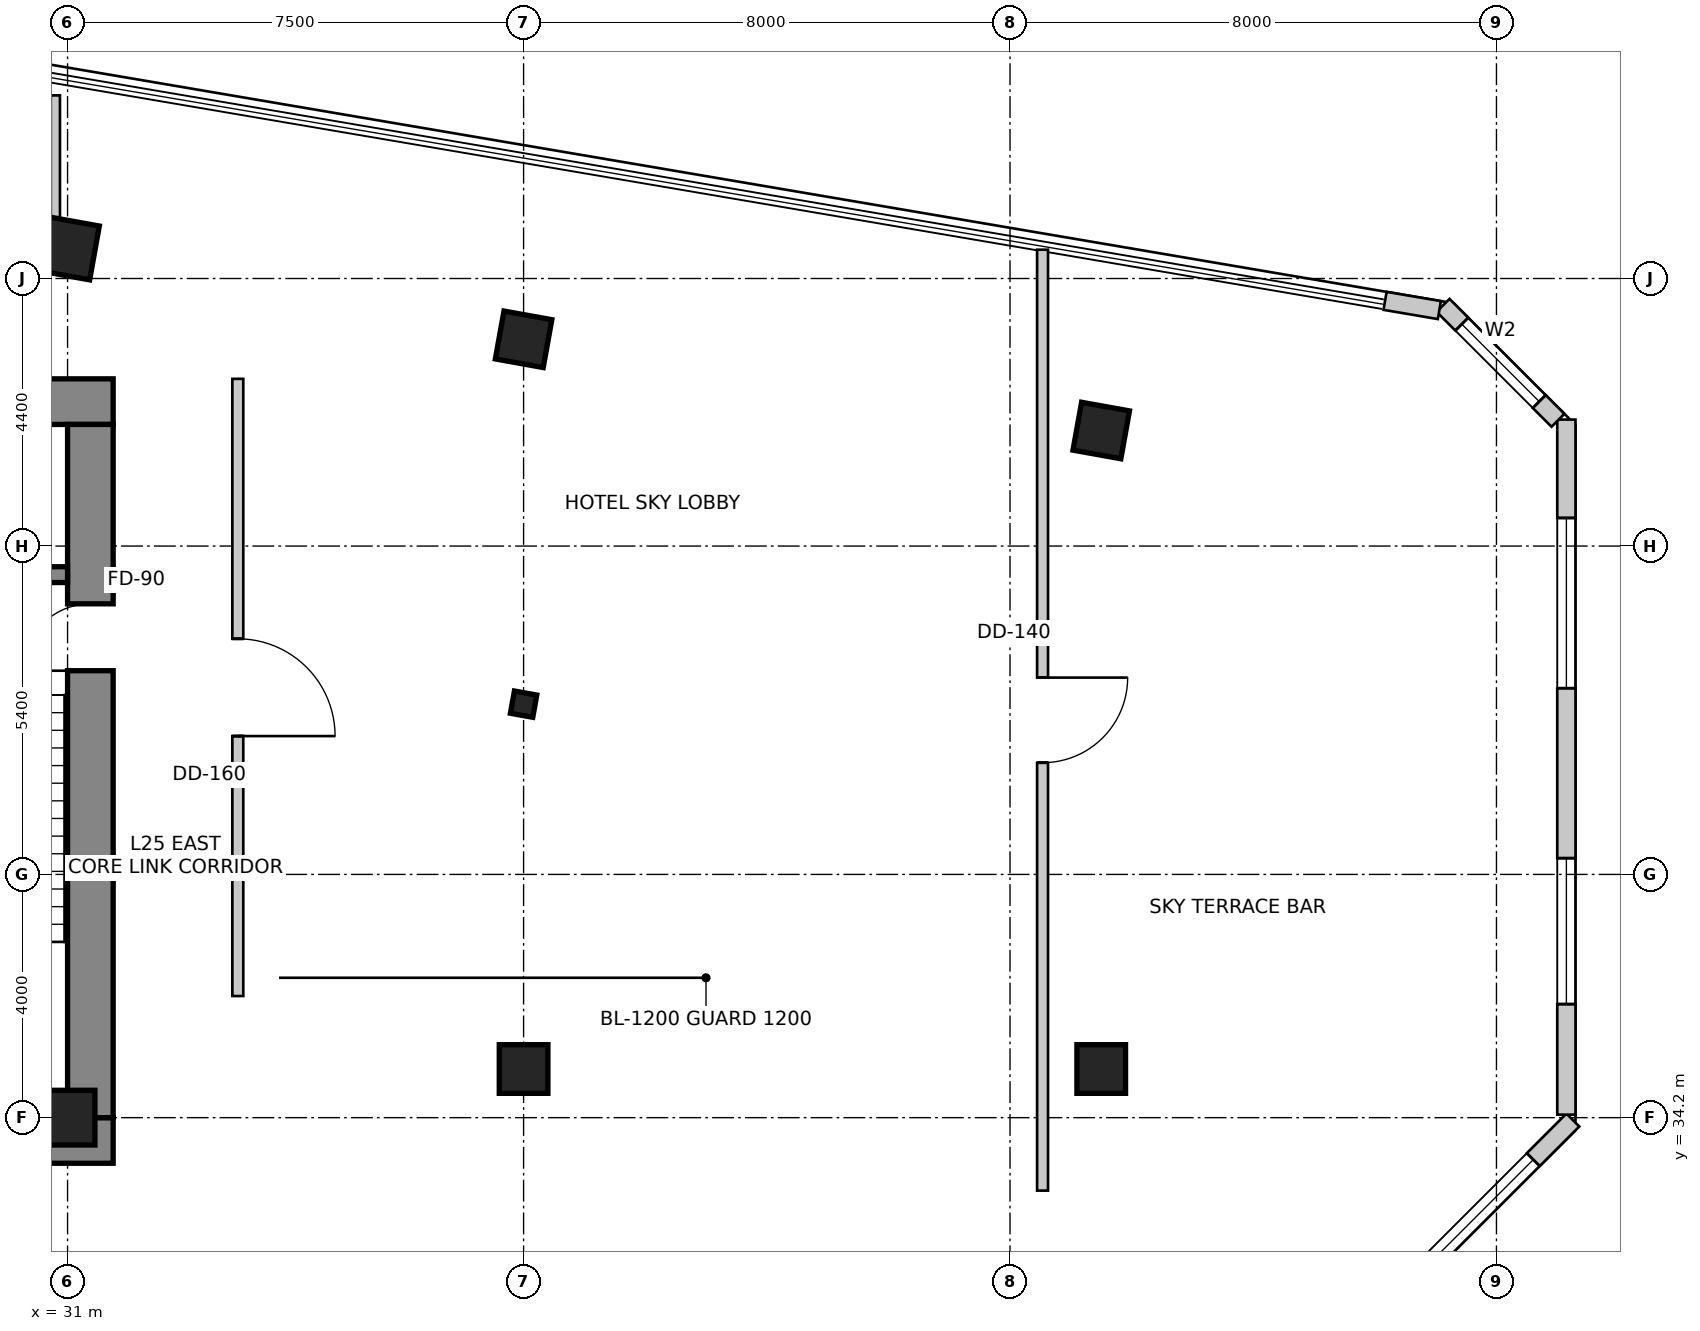
"""IFC4 building model, lengths in metres.
Left out: names, types, materials, properties, quantities, classifications, styles, units other than length and angle.
Written with IfcOpenShell. Run it as: python <this file> out.ifc"""

import sys

from ifc_helpers import new_model, si_unit, direction, frame, frame_2d, origin, origin_2d, place, context, subcontext, project, spatial, rectangle, i_section, extrude, source, transform, mapped, element, fill, save


model = new_model("IFC4")
c1 = context("Model", 3, precision=1e-05, world=origin(), true_north=direction((0.0, 1.0)))
c2 = subcontext(c1, "Body", "Model", "MODEL_VIEW")
j1 = project(units=[si_unit("LENGTHUNIT", "METRE"), si_unit("PLANEANGLEUNIT", "RADIAN")], contexts=[c1])
p1 = place(None, origin())
s1 = spatial("IfcSite", under=j1, at=p1, CompositionType="ELEMENT")
p2 = place(p1, origin())
s2 = spatial("IfcBuilding", under=s1, at=p2, CompositionType="ELEMENT")
p3 = place(p2, frame((0.0, 0.0, 105.4)))
s3 = spatial("IfcBuildingStorey", under=s2, at=p3, CompositionType="ELEMENT", Elevation=105.4)
p4 = place(p3, frame((15.85, 45.975, 0.0), z_axis=(0.0, 0.0, 1.0), x_axis=(1.0, 0.0, 0.0)))
e1 = element("IfcWall", 1, at=p4, inside=s3, PredefinedType="SHEAR", context=c2, shape_type="SweptSolid", body=[
    extrude(rectangle(XDim=15.9, YDim=0.75, at=frame_2d((7.95, 0.0))), origin(), (0.0, 0.0, 1.0), 5.2),
])
p5 = place(p3, frame((15.85, 33.825, 0.0), z_axis=(0.0, 0.0, 1.0), x_axis=(1.0, 0.0, 0.0)))
e2 = element("IfcWall", 2, at=p5, inside=s3, PredefinedType="SHEAR", context=c2, shape_type="SweptSolid", body=[
    extrude(rectangle(XDim=15.9, YDim=0.75, at=frame_2d((7.95, 0.0))), origin(), (0.0, 0.0, 1.0), 5.2),
])
m1 = source(origin(), c2, "Body", "SweptSolid", [
    extrude(rectangle(XDim=1.3, YDim=2.15, at=frame_2d((0.65, 1.075))), frame((0.0, 0.385, 0.0), z_axis=(0.0, -1.0, 0.0), x_axis=(1.0, 0.0, 0.0)), (0.0, 0.0, 1.0), 0.77),
])
p6 = place(p5, frame((10.08, 0.0, 0.0)))
e3 = element("IfcOpeningElement", 3, at=p6, cuts=e2, PredefinedType="OPENING", context=c2, shape_type="MappedRepresentation", body=[
    mapped(m1, transform((0.0, 0.0, 0.0), scale=1.0)),
])
p7 = place(p3, frame((31.375, 34.2, 0.0), z_axis=(0.0, 0.0, 1.0), x_axis=(0.0, 1.0, 0.0)))
e4 = element("IfcWall", 4, at=p7, inside=s3, PredefinedType="SHEAR", context=c2, shape_type="SweptSolid", body=[
    extrude(rectangle(XDim=11.4, YDim=0.75, at=frame_2d((5.7, 0.0))), origin(), (0.0, 0.0, 1.0), 5.2),
])
m2 = source(origin(), c2, "Body", "SweptSolid", [
    extrude(rectangle(XDim=1.1, YDim=2.15, at=frame_2d((0.55, 1.075))), frame((0.0, 0.385, 0.0), z_axis=(0.0, -1.0, 0.0), x_axis=(1.0, 0.0, 0.0)), (0.0, 0.0, 1.0), 0.77),
])
p8 = place(p7, frame((7.35, 0.0, 0.0)))
e5 = element("IfcOpeningElement", 5, at=p8, cuts=e4, PredefinedType="OPENING", context=c2, shape_type="MappedRepresentation", body=[
    mapped(m2, transform((0.0, 0.0, 0.0), scale=1.0)),
])
p9 = place(p3, frame((27.5, 43.13, 0.0), z_axis=(0.0, 0.0, 1.0), x_axis=(1.0, 0.0, 0.0)))
e6 = element("IfcWall", 6, at=p9, inside=s3, PredefinedType="SHEAR", context=c2, shape_type="SweptSolid", body=[
    extrude(rectangle(XDim=3.5, YDim=0.26, at=frame_2d((1.75, 0.0))), origin(), (0.0, 0.0, 1.0), 5.2),
])
m3 = source(origin(), c2, "Body", "SweptSolid", [
    extrude(rectangle(XDim=0.9, YDim=0.9, at=origin_2d()), origin(), (0.0, 0.0, 1.0), 5.2),
])
p10 = place(p3, frame((31.0, 48.5, 0.0), z_axis=(0.0, 0.0, 1.0), x_axis=(0.984195607969, -0.17708474032, 0.0)))
e7 = element("IfcColumn", 7, at=p10, inside=s3, PredefinedType="COLUMN", context=c2, shape_type="MappedRepresentation", body=[
    mapped(m3, transform((0.0, 0.0, 0.0), scale=1.0)),
])
m4 = source(origin(), c2, "Body", "SweptSolid", [
    extrude(rectangle(XDim=0.8, YDim=0.8, at=origin_2d()), origin(), (0.0, 0.0, 1.0), 5.2),
])
for number, where, z_axis, x_axis in (
    (8, (38.5, 47.0, 0.0), (0.0, 0.0, 1.0), (0.984, -0.177, 0.0)),
    (9, (48.0, 45.5, 0.0), (0.0, 0.0, 1.0), (0.984, -0.177, 0.0)),
):
    element("IfcColumn", number, at=place(p3, frame(where, z_axis=z_axis, x_axis=x_axis)), inside=s3, PredefinedType="COLUMN", context=c2, shape_type="MappedRepresentation", body=[
        mapped(m4, transform((0.0, 0.0, 0.0), scale=1.0)),
    ])
p11 = place(p3, frame((31.0, 34.2, 0.0), z_axis=(0.0, 0.0, 1.0), x_axis=(1.0, 0.0, 0.0)))
e10 = element("IfcColumn", 10, at=p11, inside=s3, PredefinedType="COLUMN", context=c2, shape_type="MappedRepresentation", body=[
    mapped(m3, transform((0.0, 0.0, 0.0), scale=1.0)),
])
for number, where, z_axis, x_axis in (
    (11, (38.5, 35.0, 0.0), (0.0, 0.0, 1.0), (1.0, 0.0, 0.0)),
    (12, (48.0, 35.0, 0.0), (0.0, 0.0, 1.0), (1.0, 0.0, 0.0)),
):
    element("IfcColumn", number, at=place(p3, frame(where, z_axis=z_axis, x_axis=x_axis)), inside=s3, PredefinedType="COLUMN", context=c2, shape_type="MappedRepresentation", body=[
        mapped(m4, transform((0.0, 0.0, 0.0), scale=1.0)),
    ])
m5 = source(origin(), c2, "Body", "SweptSolid", [
    extrude(i_section(OverallWidth=0.374, OverallDepth=0.372, WebThickness=0.016, FlangeThickness=0.026, FilletRadius=0.015, at=origin_2d()), origin(), (0.0, 0.0, 1.0), 5.5),
])
p12 = place(p3, frame((38.5, 41.0, -0.3), z_axis=(0.0, 0.0, 1.0), x_axis=(0.984195607969, -0.17708474032, 0.0)))
e13 = element("IfcColumn", 13, at=p12, inside=s3, PredefinedType="COLUMN", context=c2, shape_type="MappedRepresentation", body=[
    mapped(m5, transform((0.0, 0.0, 0.0), scale=1.0)),
])
p13 = place(p3, frame((52.476, 30.88, 0.0), z_axis=(0.0, 0.0, 1.0), x_axis=(0.707106781187, 0.707106781187, 0.0)))
e14 = element("IfcWall", 14, at=p13, inside=s3, PredefinedType="SOLIDWALL", context=c2, shape_type="SweptSolid", body=[
    extrude(rectangle(XDim=4.639, YDim=0.3, at=frame_2d((2.319, 0.0))), origin(), (0.0, 0.0, 1.0), 4.95),
])
m6 = source(origin(), c2, "Body", "SweptSolid", [
    extrude(rectangle(XDim=2.8, YDim=2.4, at=frame_2d((1.4, 1.2))), frame((0.0, 0.16, 0.0), z_axis=(0.0, -1.0, 0.0), x_axis=(1.0, 0.0, 0.0)), (0.0, 0.0, 1.0), 0.32),
])
p14 = place(p13, frame((0.919, 0.0, 0.85)))
e15 = element("IfcOpeningElement", 15, at=p14, cuts=e14, PredefinedType="OPENING", context=c2, shape_type="MappedRepresentation", body=[
    mapped(m6, transform((0.0, 0.0, 0.0), scale=1.0)),
])
p15 = place(p3, frame((55.65, 34.249, 0.0), z_axis=(0.0, 0.0, 1.0), x_axis=(0.0, 1.0, 0.0)))
e16 = element("IfcWall", 16, at=p15, inside=s3, PredefinedType="SOLIDWALL", context=c2, shape_type="SweptSolid", body=[
    extrude(rectangle(XDim=11.431, YDim=0.3, at=frame_2d((5.715, 0.0))), origin(), (0.0, 0.0, 1.0), 4.95),
])
m7 = source(origin(), c2, "Body", "SweptSolid", [
    extrude(rectangle(XDim=2.4, YDim=2.2, at=frame_2d((1.2, 1.1))), frame((0.0, 0.16, 0.0), z_axis=(0.0, -1.0, 0.0), x_axis=(1.0, 0.0, 0.0)), (0.0, 0.0, 1.0), 0.32),
])
p16 = place(p15, frame((1.818, 0.0, 0.85)))
e17 = element("IfcOpeningElement", 17, at=p16, cuts=e16, PredefinedType="OPENING", context=c2, shape_type="MappedRepresentation", body=[
    mapped(m7, transform((0.0, 0.0, 0.0), scale=1.0)),
])
p17 = place(p15, frame((7.013, 0.0, 0.85)))
e18 = element("IfcOpeningElement", 18, at=p17, cuts=e16, PredefinedType="OPENING", context=c2, shape_type="MappedRepresentation", body=[
    mapped(m6, transform((0.0, 0.0, 0.0), scale=1.0)),
])
p18 = place(p3, frame((55.512, 45.668, 0.0), z_axis=(0.0, 0.0, 1.0), x_axis=(-0.707152443695, 0.707061115729, 0.0)))
e19 = element("IfcWall", 19, at=p18, inside=s3, PredefinedType="SOLIDWALL", context=c2, shape_type="SweptSolid", body=[
    extrude(rectangle(XDim=2.673, YDim=0.3, at=frame_2d((1.337, 0.0))), origin(), (0.0, 0.0, 1.0), 4.95),
])
m8 = source(origin(), c2, "Body", "SweptSolid", [
    extrude(rectangle(XDim=1.8, YDim=2.1, at=frame_2d((0.9, 1.05))), frame((0.0, 0.16, 0.0), z_axis=(0.0, -1.0, 0.0), x_axis=(1.0, 0.0, 0.0)), (0.0, 0.0, 1.0), 0.32),
])
p19 = place(p18, frame((0.437, 0.0, 0.85)))
e20 = element("IfcOpeningElement", 20, at=p19, cuts=e19, PredefinedType="OPENING", context=c2, shape_type="MappedRepresentation", body=[
    mapped(m8, transform((0.0, 0.0, 0.0), scale=1.0)),
])
p20 = place(p3, frame((53.561, 47.48, 0.0), z_axis=(0.0, 0.0, 1.0), x_axis=(-0.985849611931, 0.167632164741, 0.0)))
e21 = element("IfcWall", 21, at=p20, inside=s3, PredefinedType="SOLIDWALL", context=c2, shape_type="SweptSolid", body=[
    extrude(rectangle(XDim=0.906, YDim=0.3, at=frame_2d((0.453, 0.0))), origin(), (0.0, 0.0, 1.0), 4.95),
])
p21 = place(p3, frame((24.162, 48.5, 0.0), z_axis=(0.0, 0.0, 1.0), x_axis=(1.0, 0.0, 0.0)))
e22 = element("IfcWall", 22, at=p21, inside=s3, PredefinedType="PARTITIONING", context=c2, shape_type="SweptSolid", body=[
    extrude(rectangle(XDim=6.798, YDim=0.18, at=frame_2d((3.399, 0.0))), origin(), (0.0, 0.0, 1.0), 4.092),
])
m9 = source(origin(), c2, "Body", "SweptSolid", [
    extrude(rectangle(XDim=0.85, YDim=2.15, at=frame_2d((0.425, 1.075))), frame((0.0, 0.1, 0.0), z_axis=(0.0, -1.0, 0.0), x_axis=(1.0, 0.0, 0.0)), (0.0, 0.0, 1.0), 0.2),
])
p22 = place(p21, frame((2.974, 0.0, 0.0)))
e23 = element("IfcOpeningElement", 23, at=p22, cuts=e22, PredefinedType="OPENING", context=c2, shape_type="MappedRepresentation", body=[
    mapped(m9, transform((0.0, 0.0, 0.0), scale=1.0)),
])
p23 = place(p3, frame((33.8, 46.35, 0.0), z_axis=(0.0, 0.0, 1.0), x_axis=(0.0, -1.0, 0.0)))
e24 = element("IfcWall", 24, at=p23, inside=s3, PredefinedType="PARTITIONING", context=c2, shape_type="SweptSolid", body=[
    extrude(rectangle(XDim=10.15, YDim=0.18, at=frame_2d((5.075, 0.0))), origin(), (0.0, 0.0, 1.0), 4.479),
])
m10 = source(origin(), c2, "Body", "SweptSolid", [
    extrude(rectangle(XDim=1.6, YDim=2.15, at=frame_2d((0.8, 1.075))), frame((0.0, 0.1, 0.0), z_axis=(0.0, -1.0, 0.0), x_axis=(1.0, 0.0, 0.0)), (0.0, 0.0, 1.0), 0.2),
])
p24 = place(p23, frame((4.275, 0.0, 0.0)))
e25 = element("IfcOpeningElement", 25, at=p24, cuts=e24, PredefinedType="OPENING", context=c2, shape_type="MappedRepresentation", body=[
    mapped(m10, transform((0.0, 0.0, 0.0), scale=1.0)),
])
p25 = place(p3, frame((47.035, 48.474, 0.0), z_axis=(0.0, 0.0, 1.0), x_axis=(0.0, -1.0, 0.0)))
e26 = element("IfcWall", 26, at=p25, inside=s3, PredefinedType="PARTITIONING", context=c2, shape_type="SweptSolid", body=[
    extrude(rectangle(XDim=15.474, YDim=0.18, at=frame_2d((7.737, 0.0))), origin(), (0.0, 0.0, 1.0), 4.092),
])
m11 = source(origin(), c2, "Body", "SweptSolid", [
    extrude(rectangle(XDim=1.4, YDim=2.15, at=frame_2d((0.7, 1.075))), frame((0.0, 0.1, 0.0), z_axis=(0.0, -1.0, 0.0), x_axis=(1.0, 0.0, 0.0)), (0.0, 0.0, 1.0), 0.2),
])
p26 = place(p25, frame((7.037, 0.0, 0.0)))
e27 = element("IfcOpeningElement", 27, at=p26, cuts=e26, PredefinedType="OPENING", context=c2, shape_type="MappedRepresentation", body=[
    mapped(m11, transform((0.0, 0.0, 0.0), scale=1.0)),
])
p27 = place(p3, frame((30.8, 51.011, 0.0), z_axis=(0.0, 0.0, 1.0), x_axis=(0.0, -1.0, 0.0)))
e28 = element("IfcWall", 28, at=p27, inside=s3, PredefinedType="PARTITIONING", context=c2, shape_type="SweptSolid", body=[
    extrude(rectangle(XDim=2.292, YDim=0.15, at=frame_2d((1.146, 0.0))), origin(), (0.0, 0.0, 1.0), 4.95),
])
m12 = source(origin(), c2, "Body", "SweptSolid", [
    extrude(rectangle(XDim=2.8, YDim=2.4, at=frame_2d((1.4, 1.2))), frame((0.0, -0.015, 0.0), z_axis=(0.0, -1.0, 0.0), x_axis=(1.0, 0.0, 0.0)), (0.0, 0.0, 1.0), 0.06),
])
p28 = place(p14, origin())
e29 = element("IfcWindow", 29, at=p28, inside=s3, PartitioningType="SINGLE_PANEL", PredefinedType="WINDOW", context=c2, shape_type="MappedRepresentation", body=[
    mapped(m12, transform((0.0, 0.0, 0.0), scale=1.0)),
])
fill(e15, e29)
m13 = source(origin(), c2, "Body", "SweptSolid", [
    extrude(rectangle(XDim=2.4, YDim=2.2, at=frame_2d((1.2, 1.1))), frame((0.0, -0.015, 0.0), z_axis=(0.0, -1.0, 0.0), x_axis=(1.0, 0.0, 0.0)), (0.0, 0.0, 1.0), 0.06),
])
p29 = place(p16, origin())
e30 = element("IfcWindow", 30, at=p29, inside=s3, PartitioningType="SINGLE_PANEL", PredefinedType="WINDOW", context=c2, shape_type="MappedRepresentation", body=[
    mapped(m13, transform((0.0, 0.0, 0.0), scale=1.0)),
])
fill(e17, e30)
p30 = place(p17, origin())
e31 = element("IfcWindow", 31, at=p30, inside=s3, PartitioningType="SINGLE_PANEL", PredefinedType="WINDOW", context=c2, shape_type="MappedRepresentation", body=[
    mapped(m12, transform((0.0, 0.0, 0.0), scale=1.0)),
])
fill(e18, e31)
m14 = source(origin(), c2, "Body", "SweptSolid", [
    extrude(rectangle(XDim=1.8, YDim=2.1, at=frame_2d((0.9, 1.05))), frame((0.0, -0.015, 0.0), z_axis=(0.0, -1.0, 0.0), x_axis=(1.0, 0.0, 0.0)), (0.0, 0.0, 1.0), 0.06),
])
p31 = place(p19, origin())
e32 = element("IfcWindow", 32, at=p31, inside=s3, PartitioningType="SINGLE_PANEL", PredefinedType="WINDOW", context=c2, shape_type="MappedRepresentation", body=[
    mapped(m14, transform((0.0, 0.0, 0.0), scale=1.0)),
])
fill(e20, e32)
m15 = source(origin(), c2, "Body", "SweptSolid", [
    extrude(rectangle(XDim=1.1, YDim=2.15, at=frame_2d((0.55, 1.075))), frame((0.0, 0.025, 0.0), z_axis=(0.0, -1.0, 0.0), x_axis=(1.0, 0.0, 0.0)), (0.0, 0.0, 1.0), 0.05),
])
p32 = place(p8, origin())
e33 = element("IfcDoor", 33, at=p32, inside=s3, OperationType="SINGLE_SWING_LEFT", PredefinedType="DOOR", context=c2, shape_type="MappedRepresentation", body=[
    mapped(m15, transform((0.0, 0.0, 0.0), scale=1.0)),
])
fill(e5, e33)
m16 = source(origin(), c2, "Body", "SweptSolid", [
    extrude(rectangle(XDim=1.6, YDim=2.15, at=frame_2d((0.8, 1.075))), frame((0.0, 0.025, 0.0), z_axis=(0.0, -1.0, 0.0), x_axis=(1.0, 0.0, 0.0)), (0.0, 0.0, 1.0), 0.05),
])
p33 = place(p24, origin())
e34 = element("IfcDoor", 34, at=p33, inside=s3, OperationType="SINGLE_SWING_RIGHT", PredefinedType="DOOR", context=c2, shape_type="MappedRepresentation", body=[
    mapped(m16, transform((0.0, 0.0, 0.0), scale=1.0)),
])
fill(e25, e34)
m17 = source(origin(), c2, "Body", "SweptSolid", [
    extrude(rectangle(XDim=1.4, YDim=2.15, at=frame_2d((0.7, 1.075))), frame((0.0, 0.025, 0.0), z_axis=(0.0, -1.0, 0.0), x_axis=(1.0, 0.0, 0.0)), (0.0, 0.0, 1.0), 0.05),
])
p34 = place(p26, origin())
e35 = element("IfcDoor", 35, at=p34, inside=s3, OperationType="SINGLE_SWING_LEFT", PredefinedType="DOOR", context=c2, shape_type="MappedRepresentation", body=[
    mapped(m17, transform((0.0, 0.0, 0.0), scale=1.0)),
])
fill(e27, e35)
save(model, sys.argv[1])
